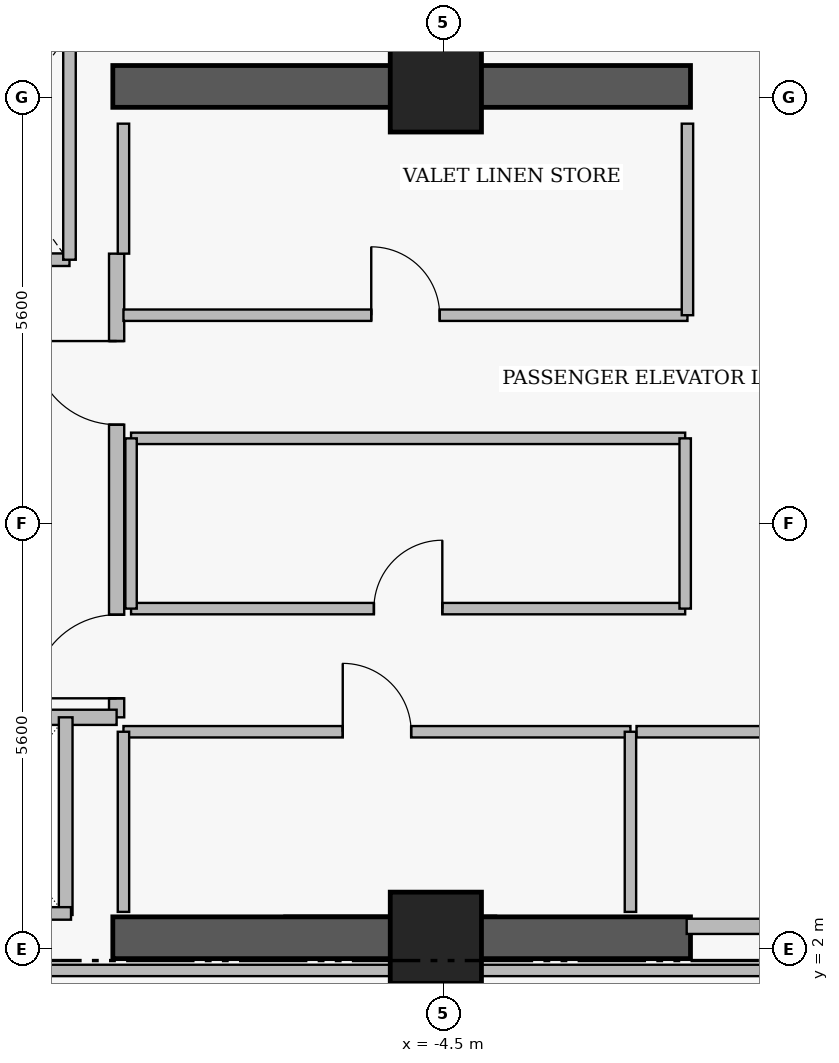
"""IFC4 building model, lengths in metres.
Left out: names, types, materials, properties, quantities, classifications, styles, units other than length and angle.
Written with IfcOpenShell. Run it as: python <this file> out.ifc"""

import sys

from ifc_helpers import new_model, si_unit, direction, frame, frame_2d, origin, origin_2d, place, context, subcontext, project, spatial, rectangle, extrude, element, fill, save


model = new_model("IFC4")
c1 = context("Model", 3, precision=1e-05, world=origin(), true_north=direction((0.0, 1.0)))
c2 = subcontext(c1, "Body", "Model", "MODEL_VIEW")
j1 = project(units=[si_unit("LENGTHUNIT", "METRE"), si_unit("PLANEANGLEUNIT", "RADIAN")], contexts=[c1])
p1 = place(None, origin())
s1 = spatial("IfcSite", under=j1, at=p1, CompositionType="ELEMENT")
p2 = place(p1, origin())
s2 = spatial("IfcBuilding", under=s1, at=p2, CompositionType="ELEMENT")
p3 = place(p2, frame((0.0, 0.0, 292.85)))
s3 = spatial("IfcBuildingStorey", under=s2, at=p3, CompositionType="ELEMENT", Elevation=292.85)
for number, where, z_axis, x_axis in (
    (1, (-8.85, 2.15, 0.0), (0.0, 0.0, 1.0), (1.0, 0.0, 0.0)),
    (2, (-8.85, 13.35, 0.0), (0.0, 0.0, 1.0), (1.0, 0.0, 0.0)),
):
    element("IfcWall", number, at=place(p3, frame(where, z_axis=z_axis, x_axis=x_axis)), inside=s3, PredefinedType="SHEAR", context=c2, shape_type="SweptSolid", body=[
        extrude(rectangle(XDim=7.6, YDim=0.55, at=frame_2d((3.8, 0.0))), origin(), (0.0, 0.0, 1.0), 4.16),
    ])
for number, where, z_axis, x_axis in (
    (3, (-4.6, 13.35, 0.0), (0.0, 0.0, 1.0), (1.0, 0.0, 0.0)),
    (4, (-4.6, 2.15, 0.0), (0.0, 0.0, 1.0), (1.0, 0.0, 0.0)),
):
    element("IfcColumn", number, at=place(p3, frame(where, z_axis=z_axis, x_axis=x_axis)), inside=s3, PredefinedType="COLUMN", context=c2, shape_type="SweptSolid", body=[
        extrude(rectangle(XDim=1.2, YDim=1.2, at=origin_2d()), origin(), (0.0, 0.0, 1.0), 4.4),
    ])
p4 = place(p3, frame((-8.8, 5.05, 0.0), z_axis=(0.0, 0.0, 1.0), x_axis=(0.0, 1.0, 0.0)))
e5 = element("IfcWall", 5, at=p4, inside=s3, PredefinedType="PARTITIONING", context=c2, shape_type="SweptSolid", body=[
    extrude(rectangle(XDim=6.1, YDim=0.2, at=frame_2d((3.05, 0.0))), origin(), (0.0, 0.0, 1.0), 4.16),
])
p5 = place(p4, frame((0.25, 0.0, 0.0)))
e6 = element("IfcOpeningElement", 6, at=p5, cuts=e5, PredefinedType="OPENING", context=c2, shape_type="SweptSolid", body=[
    extrude(rectangle(XDim=1.1, YDim=2.2, at=frame_2d((0.55, 1.1))), frame((0.0, 0.11, 0.0), z_axis=(0.0, -1.0, 0.0), x_axis=(1.0, 0.0, 0.0)), (0.0, 0.0, 1.0), 0.22),
])
p6 = place(p4, frame((3.85, 0.0, 0.0)))
e7 = element("IfcOpeningElement", 7, at=p6, cuts=e5, PredefinedType="OPENING", context=c2, shape_type="SweptSolid", body=[
    extrude(rectangle(XDim=1.1, YDim=2.2, at=frame_2d((0.55, 1.1))), frame((0.0, 0.11, 0.0), z_axis=(0.0, -1.0, 0.0), x_axis=(1.0, 0.0, 0.0)), (0.0, 0.0, 1.0), 0.22),
])
p7 = place(p3, frame((-11.58, 11.07, 0.0), z_axis=(0.0, 0.0, 1.0), x_axis=(1.0, 0.0, 0.0)))
e8 = element("IfcWall", 8, at=p7, inside=s3, PredefinedType="PARTITIONING", context=c2, shape_type="SweptSolid", body=[
    extrude(rectangle(XDim=2.16, YDim=0.165, at=frame_2d((1.08, 0.0))), origin(), (0.0, 0.0, 1.0), 4.16),
])
p8 = place(p7, frame((0.53, 0.0, 0.0)))
e9 = element("IfcOpeningElement", 9, at=p8, cuts=e8, PredefinedType="OPENING", context=c2, shape_type="SweptSolid", body=[
    extrude(rectangle(XDim=1.15, YDim=2.25, at=frame_2d((0.575, 1.125))), frame((0.0, 0.093, 0.0), z_axis=(0.0, -1.0, 0.0), x_axis=(1.0, 0.0, 0.0)), (0.0, 0.0, 1.0), 0.185),
])
p9 = place(p3, frame((-8.71, 4.86, 0.0), z_axis=(0.0, 0.0, 1.0), x_axis=(1.0, 0.0, 0.0)))
e10 = element("IfcWall", 10, at=p9, inside=s3, PredefinedType="PARTITIONING", context=c2, shape_type="SweptSolid", body=[
    extrude(rectangle(XDim=6.67, YDim=0.15, at=frame_2d((3.335, 0.0))), origin(), (0.0, 0.0, 1.0), 4.16),
])
p10 = place(p9, frame((2.885, 0.0, 0.0)))
e11 = element("IfcOpeningElement", 11, at=p10, cuts=e10, PredefinedType="OPENING", context=c2, shape_type="SweptSolid", body=[
    extrude(rectangle(XDim=0.9, YDim=2.15, at=frame_2d((0.45, 1.075))), frame((0.0, 0.085, 0.0), z_axis=(0.0, -1.0, 0.0), x_axis=(1.0, 0.0, 0.0)), (0.0, 0.0, 1.0), 0.17),
])
p11 = place(p3, frame((-1.96, 4.86, 0.0), z_axis=(0.0, 0.0, 1.0), x_axis=(1.0, 0.0, 0.0)))
e12 = element("IfcWall", 12, at=p11, inside=s3, PredefinedType="PARTITIONING", context=c2, shape_type="SweptSolid", body=[
    extrude(rectangle(XDim=5.67, YDim=0.15, at=frame_2d((2.835, 0.0))), origin(), (0.0, 0.0, 1.0), 4.16),
])
p12 = place(p11, frame((2.385, 0.0, 0.0)))
e13 = element("IfcOpeningElement", 13, at=p12, cuts=e12, PredefinedType="OPENING", context=c2, shape_type="SweptSolid", body=[
    extrude(rectangle(XDim=0.9, YDim=2.15, at=frame_2d((0.45, 1.075))), frame((0.0, 0.085, 0.0), z_axis=(0.0, -1.0, 0.0), x_axis=(1.0, 0.0, 0.0)), (0.0, 0.0, 1.0), 0.17),
])
p13 = place(p3, frame((-8.71, 10.34, 0.0), z_axis=(0.0, 0.0, 1.0), x_axis=(1.0, 0.0, 0.0)))
e14 = element("IfcWall", 14, at=p13, inside=s3, PredefinedType="PARTITIONING", context=c2, shape_type="SweptSolid", body=[
    extrude(rectangle(XDim=7.42, YDim=0.15, at=frame_2d((3.71, 0.0))), origin(), (0.0, 0.0, 1.0), 4.16),
])
p14 = place(p13, frame((3.26, 0.0, 0.0)))
e15 = element("IfcOpeningElement", 15, at=p14, cuts=e14, PredefinedType="OPENING", context=c2, shape_type="SweptSolid", body=[
    extrude(rectangle(XDim=0.9, YDim=2.15, at=frame_2d((0.45, 1.075))), frame((0.0, 0.085, 0.0), z_axis=(0.0, -1.0, 0.0), x_axis=(1.0, 0.0, 0.0)), (0.0, 0.0, 1.0), 0.17),
])
p15 = place(p3, frame((-8.61, 6.48, 0.0), z_axis=(0.0, 0.0, 1.0), x_axis=(1.0, 0.0, 0.0)))
e16 = element("IfcWall", 16, at=p15, inside=s3, PredefinedType="PARTITIONING", context=c2, shape_type="SweptSolid", body=[
    extrude(rectangle(XDim=7.29, YDim=0.15, at=frame_2d((3.645, 0.0))), origin(), (0.0, 0.0, 1.0), 4.16),
])
p16 = place(p15, frame((3.195, 0.0, 0.0)))
e17 = element("IfcOpeningElement", 17, at=p16, cuts=e16, PredefinedType="OPENING", context=c2, shape_type="SweptSolid", body=[
    extrude(rectangle(XDim=0.9, YDim=2.15, at=frame_2d((0.45, 1.075))), frame((0.0, 0.085, 0.0), z_axis=(0.0, -1.0, 0.0), x_axis=(1.0, 0.0, 0.0)), (0.0, 0.0, 1.0), 0.17),
])
p17 = place(p3, frame((-11.65, 5.05, 0.0), z_axis=(0.0, 0.0, 1.0), x_axis=(1.0, 0.0, 0.0)))
e18 = element("IfcWall", 18, at=p17, inside=s3, PredefinedType="PARTITIONING", context=c2, shape_type="SweptSolid", body=[
    extrude(rectangle(XDim=2.85, YDim=0.2, at=frame_2d((1.425, 0.0))), origin(), (0.0, 0.0, 1.0), 4.16),
])
p18 = place(p3, frame((-9.42, 11.07, 0.0), z_axis=(0.0, 0.0, 1.0), x_axis=(0.0, 1.0, 0.0)))
e19 = element("IfcWall", 19, at=p18, inside=s3, PredefinedType="PARTITIONING", context=c2, shape_type="SweptSolid", body=[
    extrude(rectangle(XDim=2.96, YDim=0.165, at=frame_2d((1.48, 0.0))), origin(), (0.0, 0.0, 1.0), 4.16),
])
p19 = place(p3, frame((-1.3, 2.3, 0.0), z_axis=(0.0, 0.0, 1.0), x_axis=(1.0, 0.0, 0.0)))
e20 = element("IfcWall", 20, at=p19, inside=s3, PredefinedType="PARTITIONING", context=c2, shape_type="SweptSolid", body=[
    extrude(rectangle(XDim=2.6, YDim=0.2, at=frame_2d((1.3, 0.0))), origin(), (0.0, 0.0, 1.0), 3.06),
])
for number, where, z_axis, x_axis in (
    (21, (-8.71, 2.49, 0.0), (0.0, 0.0, 1.0), (0.0, 1.0, 0.0)),
    (22, (-2.04, 2.49, 0.0), (0.0, 0.0, 1.0), (0.0, 1.0, 0.0)),
):
    element("IfcWall", number, at=place(p3, frame(where, z_axis=z_axis, x_axis=x_axis)), inside=s3, PredefinedType="PARTITIONING", context=c2, shape_type="SweptSolid", body=[
        extrude(rectangle(XDim=2.37, YDim=0.15, at=frame_2d((1.185, 0.0))), origin(), (0.0, 0.0, 1.0), 4.16),
    ])
p20 = place(p3, frame((-8.71, 11.15, 0.0), z_axis=(0.0, 0.0, 1.0), x_axis=(0.0, 1.0, 0.0)))
e23 = element("IfcWall", 23, at=p20, inside=s3, PredefinedType="PARTITIONING", context=c2, shape_type="SweptSolid", body=[
    extrude(rectangle(XDim=1.71, YDim=0.15, at=frame_2d((0.855, 0.0))), origin(), (0.0, 0.0, 1.0), 4.16),
])
p21 = place(p3, frame((-1.29, 10.34, 0.0), z_axis=(0.0, 0.0, 1.0), x_axis=(0.0, 1.0, 0.0)))
e24 = element("IfcWall", 24, at=p21, inside=s3, PredefinedType="PARTITIONING", context=c2, shape_type="SweptSolid", body=[
    extrude(rectangle(XDim=2.52, YDim=0.15, at=frame_2d((1.26, 0.0))), origin(), (0.0, 0.0, 1.0), 4.16),
])
p22 = place(p3, frame((-9.47, 2.45, 0.0), z_axis=(0.0, 0.0, 1.0), x_axis=(0.0, 1.0, 0.0)))
e25 = element("IfcWall", 25, at=p22, inside=s3, PredefinedType="PARTITIONING", context=c2, shape_type="SweptSolid", body=[
    extrude(rectangle(XDim=2.6, YDim=0.18, at=frame_2d((1.3, 0.0))), origin(), (0.0, 0.0, 1.0), 4.16),
])
p23 = place(p3, frame((-11.71, 2.47, 0.0), z_axis=(0.0, 0.0, 1.0), x_axis=(1.0, 0.0, 0.0)))
e26 = element("IfcWall", 26, at=p23, inside=s3, PredefinedType="PARTITIONING", context=c2, shape_type="SweptSolid", body=[
    extrude(rectangle(XDim=2.31, YDim=0.165, at=frame_2d((1.155, 0.0))), origin(), (0.0, 0.0, 1.0), 3.06),
])
p24 = place(p3, frame((-8.61, 8.72, 0.0), z_axis=(0.0, 0.0, 1.0), x_axis=(1.0, 0.0, 0.0)))
e27 = element("IfcWall", 27, at=p24, inside=s3, PredefinedType="PARTITIONING", context=c2, shape_type="SweptSolid", body=[
    extrude(rectangle(XDim=7.29, YDim=0.15, at=frame_2d((3.645, 0.0))), origin(), (0.0, 0.0, 1.0), 4.16),
])
for number, where, z_axis, x_axis in (
    (28, (-8.61, 6.48, 0.0), (0.0, 0.0, 1.0), (0.0, 1.0, 0.0)),
    (29, (-1.32, 6.48, 0.0), (0.0, 0.0, 1.0), (0.0, 1.0, 0.0)),
):
    element("IfcWall", number, at=place(p3, frame(where, z_axis=z_axis, x_axis=x_axis)), inside=s3, PredefinedType="PARTITIONING", context=c2, shape_type="SweptSolid", body=[
        extrude(rectangle(XDim=2.24, YDim=0.15, at=frame_2d((1.12, 0.0))), origin(), (0.0, 0.0, 1.0), 4.16),
    ])
p25 = place(p3, frame((-11.68, 1.72, 0.0), z_axis=(0.0, 0.0, 1.0), x_axis=(1.0, 0.0, 0.0)))
e30 = element("IfcWall", 30, at=p25, inside=s3, PredefinedType="PARTITIONING", context=c2, shape_type="SweptSolid", body=[
    extrude(rectangle(XDim=11.68, YDim=0.15, at=frame_2d((5.84, 0.0))), origin(), (0.0, 0.0, 1.0), 3.06),
])
p26 = place(p5, origin())
e31 = element("IfcDoor", 31, at=p26, inside=s3, OperationType="SINGLE_SWING_LEFT", PredefinedType="DOOR", context=c2, shape_type="SweptSolid", body=[
    extrude(rectangle(XDim=1.1, YDim=2.2, at=frame_2d((0.55, 1.1))), frame((0.0, 0.025, 0.0), z_axis=(0.0, -1.0, 0.0), x_axis=(1.0, 0.0, 0.0)), (0.0, 0.0, 1.0), 0.05),
])
fill(e6, e31)
p27 = place(p6, origin())
e32 = element("IfcDoor", 32, at=p27, inside=s3, OperationType="SINGLE_SWING_RIGHT", PredefinedType="DOOR", context=c2, shape_type="SweptSolid", body=[
    extrude(rectangle(XDim=1.1, YDim=2.2, at=frame_2d((0.55, 1.1))), frame((0.0, 0.025, 0.0), z_axis=(0.0, -1.0, 0.0), x_axis=(1.0, 0.0, 0.0)), (0.0, 0.0, 1.0), 0.05),
])
fill(e7, e32)
p28 = place(p10, origin())
e33 = element("IfcDoor", 33, at=p28, inside=s3, OperationType="SINGLE_SWING_LEFT", PredefinedType="DOOR", context=c2, shape_type="SweptSolid", body=[
    extrude(rectangle(XDim=0.9, YDim=2.15, at=frame_2d((0.45, 1.075))), frame((0.0, 0.025, 0.0), z_axis=(0.0, -1.0, 0.0), x_axis=(1.0, 0.0, 0.0)), (0.0, 0.0, 1.0), 0.05),
])
fill(e11, e33)
p29 = place(p14, origin())
e34 = element("IfcDoor", 34, at=p29, inside=s3, OperationType="SINGLE_SWING_LEFT", PredefinedType="DOOR", context=c2, shape_type="SweptSolid", body=[
    extrude(rectangle(XDim=0.9, YDim=2.15, at=frame_2d((0.45, 1.075))), frame((0.0, 0.025, 0.0), z_axis=(0.0, -1.0, 0.0), x_axis=(1.0, 0.0, 0.0)), (0.0, 0.0, 1.0), 0.05),
])
fill(e15, e34)
p30 = place(p16, origin())
e35 = element("IfcDoor", 35, at=p30, inside=s3, OperationType="SINGLE_SWING_RIGHT", PredefinedType="DOOR", context=c2, shape_type="SweptSolid", body=[
    extrude(rectangle(XDim=0.9, YDim=2.15, at=frame_2d((0.45, 1.075))), frame((0.0, 0.025, 0.0), z_axis=(0.0, -1.0, 0.0), x_axis=(1.0, 0.0, 0.0)), (0.0, 0.0, 1.0), 0.05),
])
fill(e17, e35)
save(model, sys.argv[1])
